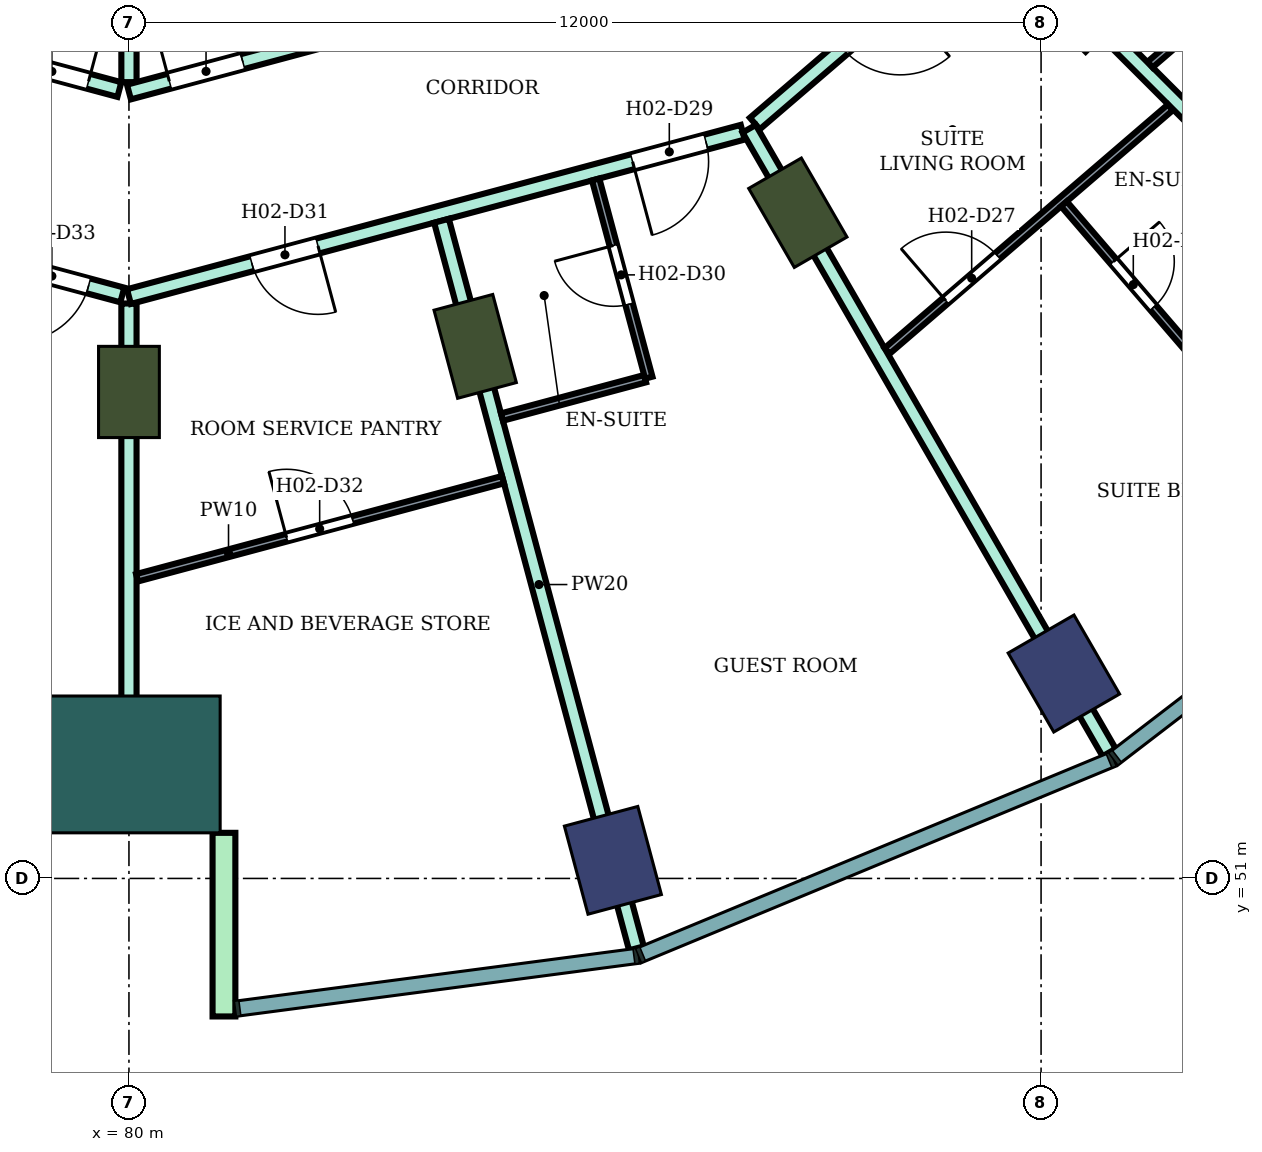
"""IFC4 building model, lengths in metres.
Left out: names, types, materials, properties, quantities, classifications, styles, units other than length and angle.
Written with IfcOpenShell. Run it as: python <this file> out.ifc"""

import sys

from ifc_helpers import new_model, si_unit, direction, frame, frame_2d, origin, origin_2d, place, context, subcontext, project, spatial, rectangle, extrude, element, fill, save


model = new_model("IFC4")
c1 = context("Model", 3, precision=1e-05, world=origin(), true_north=direction((0.0, 1.0)))
c2 = subcontext(c1, "Body", "Model", "MODEL_VIEW")
j1 = project(units=[si_unit("LENGTHUNIT", "METRE"), si_unit("PLANEANGLEUNIT", "RADIAN")], contexts=[c1])
p1 = place(None, origin())
s1 = spatial("IfcSite", under=j1, at=p1, CompositionType="ELEMENT")
p2 = place(p1, origin())
s2 = spatial("IfcBuilding", under=s1, at=p2, CompositionType="ELEMENT")
p3 = place(p2, frame((0.0, 0.0, 40.2)))
s3 = spatial("IfcBuildingStorey", under=s2, at=p3, CompositionType="ELEMENT", Elevation=40.2)
for number, where, z_axis, x_axis in (
    (1, (86.367, 51.238, 0.0), (0.0, 0.0, 1.0), (0.259, -0.966, 0.0)),
    (2, (92.3, 53.696, 0.0), (0.0, 0.0, 1.0), (0.5, -0.866, 0.0)),
):
    element("IfcColumn", number, at=place(p3, frame(where, z_axis=z_axis, x_axis=x_axis)), inside=s3, PredefinedType="COLUMN", context=c2, shape_type="SweptSolid", body=[
        extrude(rectangle(XDim=1.2, YDim=1.0, at=origin_2d()), origin(), (0.0, 0.0, 1.0), 3.8),
    ])
for number, where, z_axis, x_axis in (
    (3, (80.0, 57.4, 0.0), (0.0, 0.0, 1.0), (0.0, -1.0, 0.0)),
    (4, (84.555, 58.0, 0.0), (0.0, 0.0, 1.0), (0.259, -0.966, 0.0)),
    (5, (88.8, 59.758, 0.0), (0.0, 0.0, 1.0), (0.5, -0.866, 0.0)),
    (6, (92.445, 62.555, 0.0), (0.0, 0.0, 1.0), (0.707, -0.707, 0.0)),
):
    element("IfcColumn", number, at=place(p3, frame(where, z_axis=z_axis, x_axis=x_axis)), inside=s3, PredefinedType="COLUMN", context=c2, shape_type="SweptSolid", body=[
        extrude(rectangle(XDim=1.2, YDim=0.8, at=origin_2d()), origin(), (0.0, 0.0, 1.0), 3.8),
    ])
p4 = place(p3, frame((80.0, 52.5, 0.0), z_axis=(0.0, 0.0, 1.0), x_axis=(0.0, -1.0, 0.0)))
e7 = element("IfcColumn", 7, at=p4, inside=s3, PredefinedType="COLUMN", context=c2, shape_type="SweptSolid", body=[
    extrude(rectangle(XDim=1.8, YDim=2.4, at=origin_2d()), origin(), (0.0, 0.0, 1.0), 3.8),
])
p5 = place(p3, frame((81.25, 51.6, 0.0), z_axis=(0.0, 0.0, 1.0), x_axis=(0.0, -1.0, 0.0)))
e8 = element("IfcWall", 8, at=p5, inside=s3, PredefinedType="NOTDEFINED", context=c2, shape_type="SweptSolid", body=[
    extrude(rectangle(XDim=2.416, YDim=0.3, at=frame_2d((1.208, 0.0))), origin(), (0.0, 0.0, 1.0), 3.8),
])
p6 = place(p3, frame((71.877, 60.832, 0.0), z_axis=(0.0, 0.0, 1.0), x_axis=(0.965852509869, -0.259092510851, 0.0)))
e9 = element("IfcWall", 9, at=p6, inside=s3, PredefinedType="PARTITIONING", context=c2, shape_type="SweptSolid", body=[
    extrude(rectangle(XDim=8.32, YDim=0.2, at=frame_2d((4.16, 0.0))), origin(), (0.0, 0.0, 1.0), 3.35),
])
p7 = place(p6, frame((6.86, 0.0, 0.0)))
e10 = element("IfcOpeningElement", 10, at=p7, cuts=e9, PredefinedType="OPENING", context=c2, shape_type="SweptSolid", body=[
    extrude(rectangle(XDim=1.0, YDim=2.1, at=frame_2d((0.5, 1.05))), frame((0.0, 0.11, 0.0), z_axis=(0.0, -1.0, 0.0), x_axis=(1.0, 0.0, 0.0)), (0.0, 0.0, 1.0), 0.22),
])
p8 = place(p6, frame((0.55, 0.0, 0.0)))
e11 = element("IfcOpeningElement", 11, at=p8, cuts=e9, PredefinedType="OPENING", context=c2, shape_type="SweptSolid", body=[
    extrude(rectangle(XDim=1.0, YDim=2.1, at=frame_2d((0.5, 1.05))), frame((0.0, 0.11, 0.0), z_axis=(0.0, -1.0, 0.0), x_axis=(1.0, 0.0, 0.0)), (0.0, 0.0, 1.0), 0.22),
])
p9 = place(p3, frame((73.287, 63.145, 0.0), z_axis=(0.0, 0.0, 1.0), x_axis=(0.965854200194, -0.259086209526, 0.0)))
e12 = element("IfcWall", 12, at=p9, inside=s3, PredefinedType="PARTITIONING", context=c2, shape_type="SweptSolid", body=[
    extrude(rectangle(XDim=6.82, YDim=0.2, at=frame_2d((3.41, 0.0))), origin(), (0.0, 0.0, 1.0), 3.35),
])
p10 = place(p9, frame((5.4, 0.0, 0.0)))
e13 = element("IfcOpeningElement", 13, at=p10, cuts=e12, PredefinedType="OPENING", context=c2, shape_type="SweptSolid", body=[
    extrude(rectangle(XDim=1.0, YDim=2.1, at=frame_2d((0.5, 1.05))), frame((0.0, 0.11, 0.0), z_axis=(0.0, -1.0, 0.0), x_axis=(1.0, 0.0, 0.0)), (0.0, 0.0, 1.0), 0.22),
])
p11 = place(p3, frame((80.0, 51.8, 0.0), z_axis=(0.0, 0.0, 1.0), x_axis=(0.0, 1.0, 0.0)))
e14 = element("IfcWall", 14, at=p11, inside=s3, PredefinedType="PARTITIONING", context=c2, shape_type="SweptSolid", body=[
    extrude(rectangle(XDim=6.764, YDim=0.2, at=frame_2d((3.382, 0.0))), origin(), (0.0, 0.0, 1.0), 3.35),
])
p12 = place(p3, frame((80.0, 58.655, 0.0), z_axis=(0.0, 0.0, 1.0), x_axis=(0.965967338894, 0.258664068224, 0.0)))
e15 = element("IfcWall", 15, at=p12, inside=s3, PredefinedType="PARTITIONING", context=c2, shape_type="SweptSolid", body=[
    extrude(rectangle(XDim=8.36, YDim=0.2, at=frame_2d((4.18, 0.0))), origin(), (0.0, 0.0, 1.0), 3.35),
])
p13 = place(p12, frame((6.86, 0.0, 0.0)))
e16 = element("IfcOpeningElement", 16, at=p13, cuts=e15, PredefinedType="OPENING", context=c2, shape_type="SweptSolid", body=[
    extrude(rectangle(XDim=1.0, YDim=2.1, at=frame_2d((0.5, 1.05))), frame((0.0, 0.11, 0.0), z_axis=(0.0, -1.0, 0.0), x_axis=(1.0, 0.0, 0.0)), (0.0, 0.0, 1.0), 0.22),
])
p14 = place(p12, frame((1.675, 0.0, 0.0)))
e17 = element("IfcOpeningElement", 17, at=p14, cuts=e15, PredefinedType="OPENING", context=c2, shape_type="SweptSolid", body=[
    extrude(rectangle(XDim=0.9, YDim=2.1, at=frame_2d((0.45, 1.05))), frame((0.0, 0.11, 0.0), z_axis=(0.0, -1.0, 0.0), x_axis=(1.0, 0.0, 0.0)), (0.0, 0.0, 1.0), 0.22),
])
p15 = place(p3, frame((80.0, 61.476, 0.0), z_axis=(0.0, 0.0, 1.0), x_axis=(0.0, 1.0, 0.0)))
e18 = element("IfcWall", 18, at=p15, inside=s3, PredefinedType="PARTITIONING", context=c2, shape_type="SweptSolid", body=[
    extrude(rectangle(XDim=5.825, YDim=0.2, at=frame_2d((2.913, 0.0))), origin(), (0.0, 0.0, 1.0), 3.35),
])
p16 = place(p3, frame((80.0, 61.346, 0.0), z_axis=(0.0, 0.0, 1.0), x_axis=(0.965924181808, 0.258825182312, 0.0)))
e19 = element("IfcWall", 19, at=p16, inside=s3, PredefinedType="PARTITIONING", context=c2, shape_type="SweptSolid", body=[
    extrude(rectangle(XDim=6.94, YDim=0.2, at=frame_2d((3.47, 0.0))), origin(), (0.0, 0.0, 1.0), 3.35),
])
p17 = place(p16, frame((0.55, 0.0, 0.0)))
e20 = element("IfcOpeningElement", 20, at=p17, cuts=e19, PredefinedType="OPENING", context=c2, shape_type="SweptSolid", body=[
    extrude(rectangle(XDim=1.0, YDim=2.1, at=frame_2d((0.5, 1.05))), frame((0.0, 0.11, 0.0), z_axis=(0.0, -1.0, 0.0), x_axis=(1.0, 0.0, 0.0)), (0.0, 0.0, 1.0), 0.22),
])
p18 = place(p3, frame((84.112, 59.652, 0.0), z_axis=(0.0, 0.0, 1.0), x_axis=(0.258791091927, -0.965933315886, 0.0)))
e21 = element("IfcWall", 21, at=p18, inside=s3, PredefinedType="PARTITIONING", context=c2, shape_type="SweptSolid", body=[
    extrude(rectangle(XDim=9.909, YDim=0.2, at=frame_2d((4.955, 0.0))), origin(), (0.0, 0.0, 1.0), 3.35),
])
p19 = place(p3, frame((88.235, 60.931, 0.0), z_axis=(0.0, 0.0, 1.0), x_axis=(0.758799498714, 0.651324282329, 0.0)))
e22 = element("IfcWall", 22, at=p19, inside=s3, PredefinedType="PARTITIONING", context=c2, shape_type="SweptSolid", body=[
    extrude(rectangle(XDim=6.186, YDim=0.2, at=frame_2d((3.093, 0.0))), origin(), (0.0, 0.0, 1.0), 3.35),
])
p20 = place(p19, frame((1.519, 0.0, 0.0)))
e23 = element("IfcOpeningElement", 23, at=p20, cuts=e22, PredefinedType="OPENING", context=c2, shape_type="SweptSolid", body=[
    extrude(rectangle(XDim=1.0, YDim=2.1, at=frame_2d((0.5, 1.05))), frame((0.0, 0.11, 0.0), z_axis=(0.0, -1.0, 0.0), x_axis=(1.0, 0.0, 0.0)), (0.0, 0.0, 1.0), 0.22),
])
p21 = place(p3, frame((88.159, 60.863, 0.0), z_axis=(0.0, 0.0, 1.0), x_axis=(0.499897184548, -0.866084756177, 0.0)))
e24 = element("IfcWall", 24, at=p21, inside=s3, PredefinedType="PARTITIONING", context=c2, shape_type="SweptSolid", body=[
    extrude(rectangle(XDim=9.475, YDim=0.2, at=frame_2d((4.737, 0.0))), origin(), (0.0, 0.0, 1.0), 3.35),
])
p22 = place(p3, frame((91.449, 63.548, 0.0), z_axis=(0.0, 0.0, 1.0), x_axis=(0.706984810649, -0.707228730688, 0.0)))
e25 = element("IfcWall", 25, at=p22, inside=s3, PredefinedType="PARTITIONING", context=c2, shape_type="SweptSolid", body=[
    extrude(rectangle(XDim=7.006, YDim=0.2, at=frame_2d((3.503, 0.0))), origin(), (0.0, 0.0, 1.0), 3.35),
])
p23 = place(p3, frame((80.106, 54.956, 0.0), z_axis=(0.0, 0.0, 1.0), x_axis=(0.965910666284, 0.258875616386, 0.0)))
e26 = element("IfcWall", 26, at=p23, inside=s3, PredefinedType="PARTITIONING", context=c2, shape_type="SweptSolid", body=[
    extrude(rectangle(XDim=4.985, YDim=0.1, at=frame_2d((2.493, 0.0))), origin(), (0.0, 0.0, 1.0), 3.35),
])
p24 = place(p23, frame((2.038, 0.0, 0.0)))
e27 = element("IfcOpeningElement", 27, at=p24, cuts=e26, PredefinedType="OPENING", context=c2, shape_type="SweptSolid", body=[
    extrude(rectangle(XDim=0.9, YDim=2.1, at=frame_2d((0.45, 1.05))), frame((0.0, 0.06, 0.0), z_axis=(0.0, -1.0, 0.0), x_axis=(1.0, 0.0, 0.0)), (0.0, 0.0, 1.0), 0.12),
])
p25 = place(p3, frame((84.908, 57.07, 0.0), z_axis=(0.0, 0.0, 1.0), x_axis=(0.965853538138, 0.25908867761, 0.0)))
e28 = element("IfcWall", 28, at=p25, inside=s3, PredefinedType="PARTITIONING", context=c2, shape_type="SweptSolid", body=[
    extrude(rectangle(XDim=1.95, YDim=0.1, at=frame_2d((0.975, 0.0))), origin(), (0.0, 0.0, 1.0), 3.35),
])
p26 = place(p3, frame((86.14, 60.196, 0.0), z_axis=(0.0, 0.0, 1.0), x_axis=(0.258945475746, -0.965891940432, 0.0)))
e29 = element("IfcWall", 29, at=p26, inside=s3, PredefinedType="PARTITIONING", context=c2, shape_type="SweptSolid", body=[
    extrude(rectangle(XDim=2.7, YDim=0.1, at=frame_2d((1.35, 0.0))), origin(), (0.0, 0.0, 1.0), 3.35),
])
p27 = place(p26, frame((0.9, 0.0, 0.0)))
e30 = element("IfcOpeningElement", 30, at=p27, cuts=e29, PredefinedType="OPENING", context=c2, shape_type="SweptSolid", body=[
    extrude(rectangle(XDim=0.8, YDim=2.1, at=frame_2d((0.4, 1.05))), frame((0.0, 0.06, 0.0), z_axis=(0.0, -1.0, 0.0), x_axis=(1.0, 0.0, 0.0)), (0.0, 0.0, 1.0), 0.12),
])
p28 = place(p3, frame((89.974, 57.94, 0.0), z_axis=(0.0, 0.0, 1.0), x_axis=(0.75821417454, 0.652005571699, 0.0)))
e31 = element("IfcWall", 31, at=p28, inside=s3, PredefinedType="PARTITIONING", context=c2, shape_type="SweptSolid", body=[
    extrude(rectangle(XDim=4.915, YDim=0.1, at=frame_2d((2.457, 0.0))), origin(), (0.0, 0.0, 1.0), 3.35),
])
p29 = place(p28, frame((1.017, 0.0, 0.0)))
e32 = element("IfcOpeningElement", 32, at=p29, cuts=e31, PredefinedType="OPENING", context=c2, shape_type="SweptSolid", body=[
    extrude(rectangle(XDim=0.9, YDim=2.1, at=frame_2d((0.45, 1.05))), frame((0.0, 0.06, 0.0), z_axis=(0.0, -1.0, 0.0), x_axis=(1.0, 0.0, 0.0)), (0.0, 0.0, 1.0), 0.12),
])
p30 = place(p3, frame((92.301, 59.874, 0.0), z_axis=(0.0, 0.0, 1.0), x_axis=(0.652061320562, -0.758166231262, 0.0)))
e33 = element("IfcWall", 33, at=p30, inside=s3, PredefinedType="PARTITIONING", context=c2, shape_type="SweptSolid", body=[
    extrude(rectangle(XDim=2.8, YDim=0.1, at=frame_2d((1.4, 0.0))), origin(), (0.0, 0.0, 1.0), 3.35),
])
p31 = place(p30, frame((1.0, 0.0, 0.0)))
e34 = element("IfcOpeningElement", 34, at=p31, cuts=e33, PredefinedType="OPENING", context=c2, shape_type="SweptSolid", body=[
    extrude(rectangle(XDim=0.8, YDim=2.1, at=frame_2d((0.4, 1.05))), frame((0.0, 0.06, 0.0), z_axis=(0.0, -1.0, 0.0), x_axis=(1.0, 0.0, 0.0)), (0.0, 0.0, 1.0), 0.12),
])
p32 = place(p3, frame((93.435, 61.707, 0.0), z_axis=(0.0, 0.0, 1.0), x_axis=(0.758070495124, 0.652172618578, 0.0)))
e35 = element("IfcWall", 35, at=p32, inside=s3, PredefinedType="PARTITIONING", context=c2, shape_type="SweptSolid", body=[
    extrude(rectangle(XDim=1.789, YDim=0.1, at=frame_2d((0.895, 0.0))), origin(), (0.0, 0.0, 1.0), 3.35),
])
p33 = place(p29, origin())
e36 = element("IfcDoor", 36, at=p33, inside=s3, OperationType="SINGLE_SWING_LEFT", PredefinedType="DOOR", context=c2, shape_type="SweptSolid", body=[
    extrude(rectangle(XDim=0.9, YDim=2.1, at=frame_2d((0.45, 1.05))), frame((0.0, 0.025, 0.0), z_axis=(0.0, -1.0, 0.0), x_axis=(1.0, 0.0, 0.0)), (0.0, 0.0, 1.0), 0.05),
])
fill(e32, e36)
p34 = place(p31, origin())
e37 = element("IfcDoor", 37, at=p34, inside=s3, OperationType="SINGLE_SWING_LEFT", PredefinedType="DOOR", context=c2, shape_type="SweptSolid", body=[
    extrude(rectangle(XDim=0.8, YDim=2.1, at=frame_2d((0.4, 1.05))), frame((0.0, 0.025, 0.0), z_axis=(0.0, -1.0, 0.0), x_axis=(1.0, 0.0, 0.0)), (0.0, 0.0, 1.0), 0.05),
])
fill(e34, e37)
p35 = place(p13, frame((1.0, 0.0, 0.0), z_axis=(0.0, 0.0, 1.0), x_axis=(-1.0, 0.0, 0.0)))
e38 = element("IfcDoor", 38, at=p35, inside=s3, OperationType="SINGLE_SWING_RIGHT", PredefinedType="DOOR", context=c2, shape_type="SweptSolid", body=[
    extrude(rectangle(XDim=1.0, YDim=2.1, at=frame_2d((0.5, 1.05))), frame((0.0, 0.025, 0.0), z_axis=(0.0, -1.0, 0.0), x_axis=(1.0, 0.0, 0.0)), (0.0, 0.0, 1.0), 0.05),
])
fill(e16, e38)
p36 = place(p27, frame((0.8, 0.0, 0.0), z_axis=(0.0, 0.0, 1.0), x_axis=(-1.0, 0.0, 0.0)))
e39 = element("IfcDoor", 39, at=p36, inside=s3, OperationType="SINGLE_SWING_RIGHT", PredefinedType="DOOR", context=c2, shape_type="SweptSolid", body=[
    extrude(rectangle(XDim=0.8, YDim=2.1, at=frame_2d((0.4, 1.05))), frame((0.0, 0.025, 0.0), z_axis=(0.0, -1.0, 0.0), x_axis=(1.0, 0.0, 0.0)), (0.0, 0.0, 1.0), 0.05),
])
fill(e30, e39)
p37 = place(p14, frame((0.9, 0.0, 0.0), z_axis=(0.0, 0.0, 1.0), x_axis=(-1.0, 0.0, 0.0)))
e40 = element("IfcDoor", 40, at=p37, inside=s3, OperationType="SINGLE_SWING_LEFT", PredefinedType="DOOR", context=c2, shape_type="SweptSolid", body=[
    extrude(rectangle(XDim=0.9, YDim=2.1, at=frame_2d((0.45, 1.05))), frame((0.0, 0.025, 0.0), z_axis=(0.0, -1.0, 0.0), x_axis=(1.0, 0.0, 0.0)), (0.0, 0.0, 1.0), 0.05),
])
fill(e17, e40)
p38 = place(p24, origin())
e41 = element("IfcDoor", 41, at=p38, inside=s3, OperationType="SINGLE_SWING_LEFT", PredefinedType="DOOR", context=c2, shape_type="SweptSolid", body=[
    extrude(rectangle(XDim=0.9, YDim=2.1, at=frame_2d((0.45, 1.05))), frame((0.0, 0.025, 0.0), z_axis=(0.0, -1.0, 0.0), x_axis=(1.0, 0.0, 0.0)), (0.0, 0.0, 1.0), 0.05),
])
fill(e27, e41)
p39 = place(p7, frame((1.0, 0.0, 0.0), z_axis=(0.0, 0.0, 1.0), x_axis=(-1.0, 0.0, 0.0)))
e42 = element("IfcDoor", 42, at=p39, inside=s3, OperationType="SINGLE_SWING_RIGHT", PredefinedType="DOOR", context=c2, shape_type="SweptSolid", body=[
    extrude(rectangle(XDim=1.0, YDim=2.1, at=frame_2d((0.5, 1.05))), frame((0.0, 0.025, 0.0), z_axis=(0.0, -1.0, 0.0), x_axis=(1.0, 0.0, 0.0)), (0.0, 0.0, 1.0), 0.05),
])
fill(e10, e42)
p40 = place(p17, origin())
e43 = element("IfcDoor", 43, at=p40, inside=s3, OperationType="SINGLE_SWING_LEFT", PredefinedType="DOOR", context=c2, shape_type="SweptSolid", body=[
    extrude(rectangle(XDim=1.0, YDim=2.1, at=frame_2d((0.5, 1.05))), frame((0.0, 0.025, 0.0), z_axis=(0.0, -1.0, 0.0), x_axis=(1.0, 0.0, 0.0)), (0.0, 0.0, 1.0), 0.05),
])
fill(e20, e43)
p41 = place(p10, origin())
e44 = element("IfcDoor", 44, at=p41, inside=s3, OperationType="SINGLE_SWING_RIGHT", PredefinedType="DOOR", context=c2, shape_type="SweptSolid", body=[
    extrude(rectangle(XDim=1.0, YDim=2.1, at=frame_2d((0.5, 1.05))), frame((0.0, 0.025, 0.0), z_axis=(0.0, -1.0, 0.0), x_axis=(1.0, 0.0, 0.0)), (0.0, 0.0, 1.0), 0.05),
])
fill(e13, e44)
save(model, sys.argv[1])
